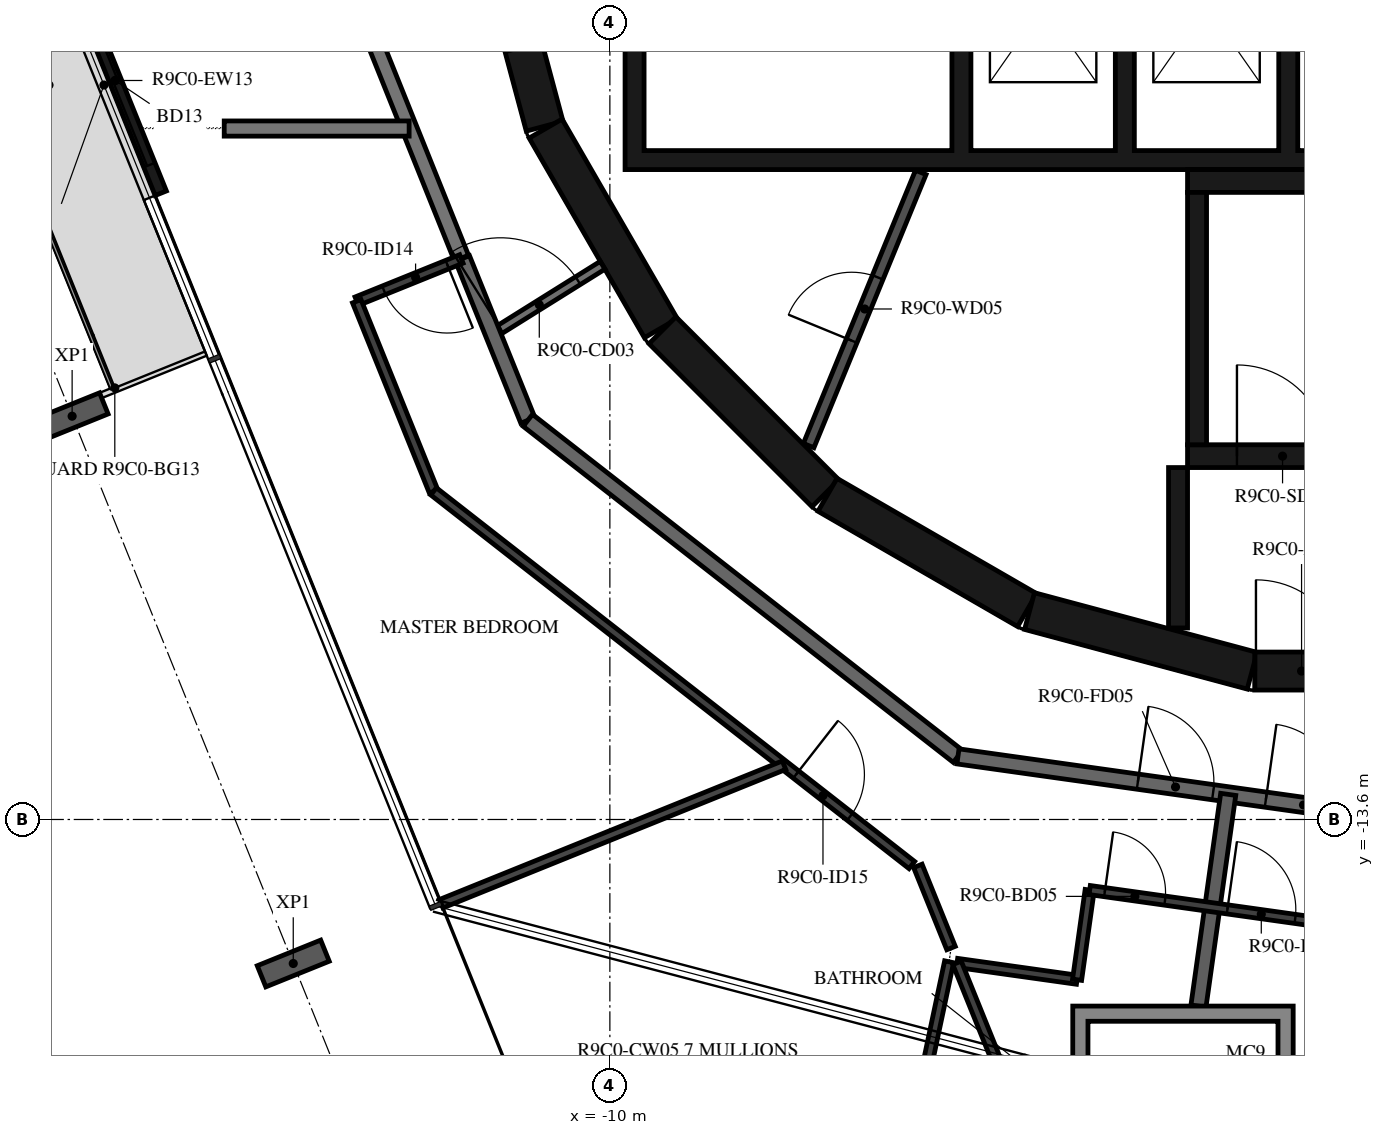
"""IFC4 building model, lengths in metres.
Left out: names, types, materials, properties, quantities, classifications, styles, units other than length and angle.
Written with IfcOpenShell. Run it as: python <this file> out.ifc"""

import sys

from ifc_helpers import new_model, si_unit, direction, frame, frame_2d, origin, origin_2d, place, context, subcontext, project, spatial, polyline, rectangle, i_section, outline, extrude, element, fill, save


model = new_model("IFC4")
c1 = context("Model", 3, precision=1e-05, world=origin(), true_north=direction((0.0, 1.0)))
c2 = subcontext(c1, "Body", "Model", "MODEL_VIEW")
j1 = project(units=[si_unit("LENGTHUNIT", "METRE"), si_unit("PLANEANGLEUNIT", "RADIAN")], contexts=[c1])
p1 = place(None, origin())
s1 = spatial("IfcSite", under=j1, at=p1, CompositionType="ELEMENT")
p2 = place(p1, origin())
s2 = spatial("IfcBuilding", under=s1, at=p2, CompositionType="ELEMENT")
p3 = place(p2, frame((0.0, 0.0, 354.0)))
s3 = spatial("IfcBuildingStorey", under=s2, at=p3, CompositionType="ELEMENT", Elevation=354.0)
for number, where, z_axis, x_axis in (
    (1, (-17.075, -8.294, -0.38), (0.0, 0.0, 1.0), (-0.375, 0.927, 0.0)),
    (2, (-14.166, -15.495, -0.38), (0.0, 0.0, 1.0), (-0.375, 0.927, 0.0)),
):
    element("IfcColumn", number, at=place(p3, frame(where, z_axis=z_axis, x_axis=x_axis)), inside=s3, PredefinedType="COLUMN", context=c2, shape_type="SweptSolid", body=[
        extrude(i_section(OverallWidth=0.3, OverallDepth=0.9, WebThickness=0.019, FlangeThickness=0.035, FilletRadius=0.03, at=origin_2d()), origin(), (0.0, 0.0, 1.0), 3.5),
    ])
p4 = place(p3, frame((-17.107, -2.394, 0.0), z_axis=(0.0, 0.0, 1.0), x_axis=(0.374598019739, -0.927187318511, 0.0)))
e3 = element("IfcWall", 3, at=p4, inside=s3, PredefinedType="STANDARD", context=c2, shape_type="SweptSolid", body=[
    extrude(rectangle(XDim=3.2, YDim=0.16, at=frame_2d((1.6, 0.0))), origin(), (0.0, 0.0, 1.0), 3.12),
])
p5 = place(p4, frame((0.4, 0.0, 0.0)))
e4 = element("IfcOpeningElement", 4, at=p5, cuts=e3, PredefinedType="OPENING", context=c2, shape_type="SweptSolid", body=[
    extrude(rectangle(XDim=2.4, YDim=2.4, at=frame_2d((1.2, 1.2))), frame((0.0, 0.09, 0.0), z_axis=(0.0, -1.0, 0.0), x_axis=(1.0, 0.0, 0.0)), (0.0, 0.0, 1.0), 0.18),
])
p6 = place(p3, frame((-11.643, -1.55, 0.0), z_axis=(0.0, 0.0, 1.0), x_axis=(0.258734743916, -0.965948410781, 0.0)))
e5 = element("IfcWall", 5, at=p6, inside=s3, PredefinedType="SHEAR", context=c2, shape_type="SweptSolid", body=[
    extrude(rectangle(XDim=3.033, YDim=0.5, at=frame_2d((1.516, 0.0))), origin(), (0.0, 0.0, 1.0), 3.12),
])
p7 = place(p6, frame((1.066, 0.0, 0.0)))
e6 = element("IfcOpeningElement", 6, at=p7, cuts=e5, PredefinedType="OPENING", context=c2, shape_type="SweptSolid", body=[
    extrude(rectangle(XDim=0.9, YDim=2.1, at=frame_2d((0.45, 1.05))), frame((0.0, 0.26, 0.0), z_axis=(0.0, -1.0, 0.0), x_axis=(1.0, 0.0, 0.0)), (0.0, 0.0, 1.0), 0.52),
])
p8 = place(p3, frame((-10.845, -4.51, 0.0), z_axis=(0.0, 0.0, 1.0), x_axis=(0.500087131594, -0.865975092491, 0.0)))
e7 = element("IfcWall", 7, at=p8, inside=s3, PredefinedType="SHEAR", context=c2, shape_type="SweptSolid", body=[
    extrude(rectangle(XDim=3.033, YDim=0.5, at=frame_2d((1.516, 0.0))), origin(), (0.0, 0.0, 1.0), 3.12),
])
p9 = place(p3, frame((-9.308, -7.164, 0.0), z_axis=(0.0, 0.0, 1.0), x_axis=(0.707106781187, -0.707106781187, 0.0)))
e8 = element("IfcWall", 8, at=p9, inside=s3, PredefinedType="SHEAR", context=c2, shape_type="SweptSolid", body=[
    extrude(rectangle(XDim=3.032, YDim=0.5, at=frame_2d((1.516, 0.0))), origin(), (0.0, 0.0, 1.0), 3.12),
])
for number, where, z_axis, x_axis in (
    (9, (-7.137, -9.329, 0.0), (0.0, 0.0, 1.0), (0.866, -0.5, 0.0)),
    (10, (-4.479, -10.858, 0.0), (0.0, 0.0, 1.0), (0.966, -0.259, 0.0)),
):
    element("IfcWall", number, at=place(p3, frame(where, z_axis=z_axis, x_axis=x_axis)), inside=s3, PredefinedType="SHEAR", context=c2, shape_type="SweptSolid", body=[
        extrude(rectangle(XDim=3.033, YDim=0.5, at=frame_2d((1.516, 0.0))), origin(), (0.0, 0.0, 1.0), 3.12),
    ])
p10 = place(p3, frame((-1.516, -11.647, 0.0), z_axis=(0.0, 0.0, 1.0), x_axis=(1.0, 0.0, 0.0)))
e11 = element("IfcWall", 11, at=p10, inside=s3, PredefinedType="SHEAR", context=c2, shape_type="SweptSolid", body=[
    extrude(rectangle(XDim=3.033, YDim=0.5, at=frame_2d((1.516, 0.0))), origin(), (0.0, 0.0, 1.0), 3.12),
])
p11 = place(p10, frame((0.016, 0.0, 0.0)))
e12 = element("IfcOpeningElement", 12, at=p11, cuts=e11, PredefinedType="OPENING", context=c2, shape_type="SweptSolid", body=[
    extrude(rectangle(XDim=1.2, YDim=2.1, at=frame_2d((0.6, 1.05))), frame((0.0, 0.26, 0.0), z_axis=(0.0, -1.0, 0.0), x_axis=(1.0, 0.0, 0.0)), (0.0, 0.0, 1.0), 0.52),
])
p12 = place(p3, frame((-2.275, -8.67, 0.0), z_axis=(0.0, 0.0, 1.0), x_axis=(0.0, 1.0, 0.0)))
e13 = element("IfcWall", 13, at=p12, inside=s3, PredefinedType="SHEAR", context=c2, shape_type="SweptSolid", body=[
    extrude(rectangle(XDim=3.32, YDim=0.25, at=frame_2d((1.66, 0.0))), origin(), (0.0, 0.0, 1.0), 3.12),
])
p13 = place(p3, frame((-2.4, -5.2, 0.0), z_axis=(0.0, 0.0, 1.0), x_axis=(1.0, 0.0, 0.0)))
e14 = element("IfcWall", 14, at=p13, inside=s3, PredefinedType="SHEAR", context=c2, shape_type="SweptSolid", body=[
    extrude(rectangle(XDim=7.05, YDim=0.3, at=frame_2d((3.525, 0.0))), origin(), (0.0, 0.0, 1.0), 3.12),
])
p14 = place(p3, frame((-2.4, -8.82, 0.0), z_axis=(0.0, 0.0, 1.0), x_axis=(1.0, 0.0, 0.0)))
e15 = element("IfcWall", 15, at=p14, inside=s3, PredefinedType="SHEAR", context=c2, shape_type="SweptSolid", body=[
    extrude(rectangle(XDim=2.5, YDim=0.3, at=frame_2d((1.25, 0.0))), origin(), (0.0, 0.0, 1.0), 3.12),
])
p15 = place(p14, frame((0.65, 0.0, 0.0)))
e16 = element("IfcOpeningElement", 16, at=p15, cuts=e15, PredefinedType="OPENING", context=c2, shape_type="SweptSolid", body=[
    extrude(rectangle(XDim=1.2, YDim=2.1, at=frame_2d((0.6, 1.05))), frame((0.0, 0.16, 0.0), z_axis=(0.0, -1.0, 0.0), x_axis=(1.0, 0.0, 0.0)), (0.0, 0.0, 1.0), 0.32),
])
p16 = place(p3, frame((-2.525, -8.97, 0.0), z_axis=(0.0, 0.0, 1.0), x_axis=(0.0, -1.0, 0.0)))
e17 = element("IfcWall", 17, at=p16, inside=s3, PredefinedType="SHEAR", context=c2, shape_type="SweptSolid", body=[
    extrude(rectangle(XDim=2.11, YDim=0.25, at=frame_2d((1.055, 0.0))), origin(), (0.0, 0.0, 1.0), 3.12),
])
p17 = place(p3, origin())
e18 = element("IfcWall", 18, at=p17, inside=s3, PredefinedType="SHEAR", context=c2, shape_type="SweptSolid", body=[
    extrude(outline(polyline([(9.8, -5.05), (9.8, -4.8), (9.8, -1.9), (9.55, -1.9), (9.55, -4.8), (7.65, -4.8), (7.65, -1.9), (7.4, -1.9), (7.4, -4.8), (5.5, -4.8), (5.5, -1.9), (5.25, -1.9), (5.25, -4.8), (3.35, -4.8), (3.35, -1.9), (3.1, -1.9), (3.1, -4.8), (1.2, -4.8), (1.2, -1.9), (0.95, -1.9), (0.95, -4.8), (-0.95, -4.8), (-0.95, -1.9), (-1.2, -1.9), (-1.2, -4.8), (-3.1, -4.8), (-3.1, -1.9), (-3.35, -1.9), (-3.35, -4.8), (-5.25, -4.8), (-5.25, -1.9), (-5.5, -1.9), (-5.5, -4.8), (-9.55, -4.8), (-9.55, -1.9), (-9.8, -1.9), (-9.8, -4.8), (-9.8, -5.05), (9.8, -5.05)])), origin(), (0.0, 0.0, 1.0), 3.12),
])
p18 = place(p3, frame((-7.385, -8.681, 0.0), z_axis=(0.0, 0.0, 1.0), x_axis=(0.379804590409, 0.925066739811, 0.0)))
e19 = element("IfcWall", 19, at=p18, inside=s3, PredefinedType="PARTITIONING", context=c2, shape_type="SweptSolid", body=[
    extrude(rectangle(XDim=3.885, YDim=0.15, at=frame_2d((1.942, 0.0))), origin(), (0.0, 0.0, 1.0), 3.12),
])
p19 = place(p18, frame((1.493, 0.0, 0.0)))
e20 = element("IfcOpeningElement", 20, at=p19, cuts=e19, PredefinedType="OPENING", context=c2, shape_type="SweptSolid", body=[
    extrude(rectangle(XDim=0.9, YDim=2.1, at=frame_2d((0.45, 1.05))), frame((0.0, 0.085, 0.0), z_axis=(0.0, -1.0, 0.0), x_axis=(1.0, 0.0, 0.0)), (0.0, 0.0, 1.0), 0.17),
])
p20 = place(p3, frame((-11.539, -7.21, 0.0), z_axis=(0.0, 0.0, 1.0), x_axis=(0.848103039868, 0.529831325769, 0.0)))
e21 = element("IfcWall", 21, at=p20, inside=s3, PredefinedType="PARTITIONING", context=c2, shape_type="SweptSolid", body=[
    extrude(rectangle(XDim=1.702, YDim=0.12, at=frame_2d((0.851, 0.0))), origin(), (0.0, 0.0, 1.0), 3.12),
])
p21 = place(p20, frame((0.12, 0.0, 0.0)))
e22 = element("IfcOpeningElement", 22, at=p21, cuts=e21, PredefinedType="OPENING", context=c2, shape_type="SweptSolid", body=[
    extrude(rectangle(XDim=1.2, YDim=2.1, at=frame_2d((0.6, 1.05))), frame((0.0, 0.07, 0.0), z_axis=(0.0, -1.0, 0.0), x_axis=(1.0, 0.0, 0.0)), (0.0, 0.0, 1.0), 0.14),
])
p22 = place(p3, frame((-13.769, -1.691, 0.0), z_axis=(0.0, 0.0, 1.0), x_axis=(0.372720094028, -0.927943819155, 0.0)))
e23 = element("IfcWall", 23, at=p22, inside=s3, PredefinedType="STANDARD", context=c2, shape_type="SweptSolid", body=[
    extrude(rectangle(XDim=4.875, YDim=0.2, at=frame_2d((2.438, 0.0))), origin(), (0.0, 0.0, 1.0), 3.12),
])
p23 = place(p3, frame((-11.939, -6.22, 0.0), z_axis=(0.0, 0.0, 1.0), x_axis=(0.374651128394, -0.927165860024, 0.0)))
e24 = element("IfcWall", 24, at=p23, inside=s3, PredefinedType="STANDARD", context=c2, shape_type="SweptSolid", body=[
    extrude(rectangle(XDim=2.296, YDim=0.2, at=frame_2d((1.148, 0.0))), origin(), (0.0, 0.0, 1.0), 3.12),
])
p24 = place(p3, frame((-11.079, -8.349, 0.0), z_axis=(0.0, 0.0, 1.0), x_axis=(0.78800478687, -0.615669112324, 0.0)))
e25 = element("IfcWall", 25, at=p24, inside=s3, PredefinedType="STANDARD", context=c2, shape_type="SweptSolid", body=[
    extrude(rectangle(XDim=7.181, YDim=0.2, at=frame_2d((3.591, 0.0))), origin(), (0.0, 0.0, 1.0), 3.12),
])
p25 = place(p3, frame((-5.42, -12.77, 0.0), z_axis=(0.0, 0.0, 1.0), x_axis=(0.990270565508, -0.139155334385, 0.0)))
e26 = element("IfcWall", 26, at=p25, inside=s3, PredefinedType="STANDARD", context=c2, shape_type="SweptSolid", body=[
    extrude(rectangle(XDim=7.181, YDim=0.2, at=frame_2d((3.59, 0.0))), origin(), (0.0, 0.0, 1.0), 3.12),
])
p26 = place(p25, frame((2.39, 0.0, 0.0)))
e27 = element("IfcOpeningElement", 27, at=p26, cuts=e26, PredefinedType="OPENING", context=c2, shape_type="SweptSolid", body=[
    extrude(rectangle(XDim=1.0, YDim=2.1, at=frame_2d((0.5, 1.05))), frame((0.0, 0.11, 0.0), z_axis=(0.0, -1.0, 0.0), x_axis=(1.0, 0.0, 0.0)), (0.0, 0.0, 1.0), 0.22),
])
p27 = place(p25, frame((4.091, 0.0, 0.0)))
e28 = element("IfcOpeningElement", 28, at=p27, cuts=e26, PredefinedType="OPENING", context=c2, shape_type="SweptSolid", body=[
    extrude(rectangle(XDim=1.0, YDim=2.1, at=frame_2d((0.5, 1.05))), frame((0.0, 0.11, 0.0), z_axis=(0.0, -1.0, 0.0), x_axis=(1.0, 0.0, 0.0)), (0.0, 0.0, 1.0), 0.22),
])
p28 = place(p3, frame((-15.074, -4.51, 0.0), z_axis=(0.0, 0.0, 1.0), x_axis=(1.0, 0.0, 0.0)))
e29 = element("IfcWall", 29, at=p28, inside=s3, PredefinedType="STANDARD", context=c2, shape_type="SweptSolid", body=[
    extrude(rectangle(XDim=2.433, YDim=0.2, at=frame_2d((1.216, 0.0))), origin(), (0.0, 0.0, 1.0), 3.12),
])
p29 = place(p3, frame((-2.256, -16.055, 0.0), z_axis=(0.0, 0.0, 1.0), x_axis=(0.139148428478, 0.990271535919, 0.0)))
e30 = element("IfcWall", 30, at=p29, inside=s3, PredefinedType="STANDARD", context=c2, shape_type="SweptSolid", body=[
    extrude(rectangle(XDim=2.812, YDim=0.2, at=frame_2d((1.406, 0.0))), origin(), (0.0, 0.0, 1.0), 3.12),
])
p30 = place(p3, frame((-11.953, -6.225, 0.0), z_axis=(0.0, 0.0, 1.0), x_axis=(-0.927144096717, -0.374704982518, 0.0)))
e31 = element("IfcWall", 31, at=p30, inside=s3, PredefinedType="PARTITIONING", context=c2, shape_type="SweptSolid", body=[
    extrude(rectangle(XDim=1.485, YDim=0.12, at=frame_2d((0.742, 0.0))), origin(), (0.0, 0.0, 1.0), 3.12),
])
p31 = place(p30, frame((0.2, 0.0, 0.0)))
e32 = element("IfcOpeningElement", 32, at=p31, cuts=e31, PredefinedType="OPENING", context=c2, shape_type="SweptSolid", body=[
    extrude(rectangle(XDim=0.9, YDim=2.1, at=frame_2d((0.45, 1.05))), frame((0.0, 0.07, 0.0), z_axis=(0.0, -1.0, 0.0), x_axis=(1.0, 0.0, 0.0)), (0.0, 0.0, 1.0), 0.14),
])
p32 = place(p3, frame((-13.33, -6.782, 0.0), z_axis=(0.0, 0.0, 1.0), x_axis=(0.374602180132, -0.927185637637, 0.0)))
e33 = element("IfcWall", 33, at=p32, inside=s3, PredefinedType="PARTITIONING", context=c2, shape_type="SweptSolid", body=[
    extrude(rectangle(XDim=2.698, YDim=0.12, at=frame_2d((1.349, 0.0))), origin(), (0.0, 0.0, 1.0), 3.12),
])
p33 = place(p3, frame((-12.319, -9.283, 0.0), z_axis=(0.0, 0.0, 1.0), x_axis=(0.788000268464, -0.61567489546, 0.0)))
e34 = element("IfcWall", 34, at=p33, inside=s3, PredefinedType="PARTITIONING", context=c2, shape_type="SweptSolid", body=[
    extrude(rectangle(XDim=7.985, YDim=0.12, at=frame_2d((3.992, 0.0))), origin(), (0.0, 0.0, 1.0), 3.12),
])
p34 = place(p33, frame((6.051, 0.0, 0.0)))
e35 = element("IfcOpeningElement", 35, at=p34, cuts=e34, PredefinedType="OPENING", context=c2, shape_type="SweptSolid", body=[
    extrude(rectangle(XDim=0.9, YDim=2.1, at=frame_2d((0.45, 1.05))), frame((0.0, 0.07, 0.0), z_axis=(0.0, -1.0, 0.0), x_axis=(1.0, 0.0, 0.0)), (0.0, 0.0, 1.0), 0.14),
])
p35 = place(p3, frame((-5.948, -14.21, 0.0), z_axis=(0.0, 0.0, 1.0), x_axis=(0.374601530156, -0.927185900241, 0.0)))
e36 = element("IfcWall", 36, at=p35, inside=s3, PredefinedType="PARTITIONING", context=c2, shape_type="SweptSolid", body=[
    extrude(rectangle(XDim=1.166, YDim=0.12, at=frame_2d((0.583, 0.0))), origin(), (0.0, 0.0, 1.0), 3.12),
])
p36 = place(p3, frame((-5.433, -15.487, 0.0), z_axis=(0.0, 0.0, 1.0), x_axis=(0.990268451053, -0.139170380644, 0.0)))
e37 = element("IfcWall", 37, at=p36, inside=s3, PredefinedType="PARTITIONING", context=c2, shape_type="SweptSolid", body=[
    extrude(rectangle(XDim=1.595, YDim=0.12, at=frame_2d((0.797, 0.0))), origin(), (0.0, 0.0, 1.0), 3.12),
])
p37 = place(p3, frame((-3.854, -15.708, 0.0), z_axis=(0.0, 0.0, 1.0), x_axis=(0.139298773474, 0.99025039849, 0.0)))
e38 = element("IfcWall", 38, at=p37, inside=s3, PredefinedType="PARTITIONING", context=c2, shape_type="SweptSolid", body=[
    extrude(rectangle(XDim=1.192, YDim=0.12, at=frame_2d((0.596, 0.0))), origin(), (0.0, 0.0, 1.0), 3.12),
])
p38 = place(p3, frame((-3.688, -14.528, 0.0), z_axis=(0.0, 0.0, 1.0), x_axis=(0.990273413633, -0.139135064782, 0.0)))
e39 = element("IfcWall", 39, at=p38, inside=s3, PredefinedType="PARTITIONING", context=c2, shape_type="SweptSolid", body=[
    extrude(rectangle(XDim=5.622, YDim=0.12, at=frame_2d((2.811, 0.0))), origin(), (0.0, 0.0, 1.0), 3.12),
])
p39 = place(p38, frame((0.2, 0.0, 0.0)))
e40 = element("IfcOpeningElement", 40, at=p39, cuts=e39, PredefinedType="OPENING", context=c2, shape_type="SweptSolid", body=[
    extrude(rectangle(XDim=0.8, YDim=2.1, at=frame_2d((0.4, 1.05))), frame((0.0, 0.07, 0.0), z_axis=(0.0, -1.0, 0.0), x_axis=(1.0, 0.0, 0.0)), (0.0, 0.0, 1.0), 0.14),
])
p40 = place(p38, frame((1.83, 0.0, 0.0)))
e41 = element("IfcOpeningElement", 41, at=p40, cuts=e39, PredefinedType="OPENING", context=c2, shape_type="SweptSolid", body=[
    extrude(rectangle(XDim=0.9, YDim=2.1, at=frame_2d((0.45, 1.05))), frame((0.0, 0.07, 0.0), z_axis=(0.0, -1.0, 0.0), x_axis=(1.0, 0.0, 0.0)), (0.0, 0.0, 1.0), 0.14),
])
p41 = place(p3, frame((-12.219, -14.708, 0.0), z_axis=(0.0, 0.0, 1.0), x_axis=(0.927176471086, 0.374624867655, 0.0)))
e42 = element("IfcWall", 42, at=p41, inside=s3, PredefinedType="PARTITIONING", context=c2, shape_type="SweptSolid", body=[
    extrude(rectangle(XDim=4.864, YDim=0.12, at=frame_2d((2.432, 0.0))), origin(), (0.0, 0.0, 1.0), 2.73),
])
p42 = place(p3, frame((-7.305, -23.815, 0.0), z_axis=(0.0, 0.0, 1.0), x_axis=(0.207366409306, 0.978263345062, 0.0)))
e43 = element("IfcWall", 43, at=p42, inside=s3, PredefinedType="PARTITIONING", context=c2, shape_type="SweptSolid", body=[
    extrude(rectangle(XDim=8.529, YDim=0.12, at=frame_2d((4.264, 0.0))), origin(), (0.0, 0.0, 1.0), 3.12),
])
p43 = place(p42, frame((0.4, 0.0, 0.0)))
e44 = element("IfcOpeningElement", 44, at=p43, cuts=e43, PredefinedType="OPENING", context=c2, shape_type="SweptSolid", body=[
    extrude(rectangle(XDim=0.9, YDim=2.1, at=frame_2d((0.45, 1.05))), frame((0.0, 0.07, 0.0), z_axis=(0.0, -1.0, 0.0), x_axis=(1.0, 0.0, 0.0)), (0.0, 0.0, 1.0), 0.14),
])
p44 = place(p3, frame((-4.445, -17.93, 0.0), z_axis=(0.0, 0.0, 1.0), x_axis=(-0.374614676827, 0.927180588616, 0.0)))
e45 = element("IfcWall", 45, at=p44, inside=s3, PredefinedType="PARTITIONING", context=c2, shape_type="SweptSolid", body=[
    extrude(rectangle(XDim=2.635, YDim=0.12, at=frame_2d((1.318, 0.0))), origin(), (0.0, 0.0, 1.0), 3.12),
])
p45 = place(p3, origin())
e46 = element("IfcWall", 46, at=p45, inside=s3, PredefinedType="STANDARD", context=c2, shape_type="SweptSolid", body=[
    extrude(outline(polyline([(-1.01, -16.055), (-1.01, -18.955), (-3.91, -18.955), (-3.91, -16.055), (-1.01, -16.055)]), holes=[polyline([(-3.71, -18.755), (-1.21, -18.755), (-1.21, -16.255), (-3.71, -16.255), (-3.71, -18.755)])]), origin(), (0.0, 0.0, 1.0), 3.12),
])
p46 = place(p5, origin())
e47 = element("IfcDoor", 47, at=p46, inside=s3, OperationType="DOUBLE_DOOR_SLIDING", PredefinedType="DOOR", context=c2, shape_type="SweptSolid", body=[
    extrude(rectangle(XDim=2.4, YDim=2.4, at=frame_2d((1.2, 1.2))), frame((0.0, 0.025, 0.0), z_axis=(0.0, -1.0, 0.0), x_axis=(1.0, 0.0, 0.0)), (0.0, 0.0, 1.0), 0.05),
])
fill(e4, e47)
p47 = place(p15, origin())
e48 = element("IfcDoor", 48, at=p47, inside=s3, OperationType="SINGLE_SWING_LEFT", PredefinedType="DOOR", context=c2, shape_type="SweptSolid", body=[
    extrude(rectangle(XDim=1.2, YDim=2.1, at=frame_2d((0.6, 1.05))), frame((0.0, 0.025, 0.0), z_axis=(0.0, -1.0, 0.0), x_axis=(1.0, 0.0, 0.0)), (0.0, 0.0, 1.0), 0.05),
])
fill(e16, e48)
p48 = place(p11, origin())
e49 = element("IfcDoor", 49, at=p48, inside=s3, OperationType="SINGLE_SWING_RIGHT", PredefinedType="DOOR", context=c2, shape_type="SweptSolid", body=[
    extrude(rectangle(XDim=1.2, YDim=2.1, at=frame_2d((0.6, 1.05))), frame((0.0, 0.025, 0.0), z_axis=(0.0, -1.0, 0.0), x_axis=(1.0, 0.0, 0.0)), (0.0, 0.0, 1.0), 0.05),
])
fill(e12, e49)
p49 = place(p19, origin())
e50 = element("IfcDoor", 50, at=p49, inside=s3, OperationType="SINGLE_SWING_LEFT", PredefinedType="DOOR", context=c2, shape_type="SweptSolid", body=[
    extrude(rectangle(XDim=0.9, YDim=2.1, at=frame_2d((0.45, 1.05))), frame((0.0, 0.025, 0.0), z_axis=(0.0, -1.0, 0.0), x_axis=(1.0, 0.0, 0.0)), (0.0, 0.0, 1.0), 0.05),
])
fill(e20, e50)
p50 = place(p26, origin())
e51 = element("IfcDoor", 51, at=p50, inside=s3, OperationType="SINGLE_SWING_RIGHT", PredefinedType="DOOR", context=c2, shape_type="SweptSolid", body=[
    extrude(rectangle(XDim=1.0, YDim=2.1, at=frame_2d((0.5, 1.05))), frame((0.0, 0.025, 0.0), z_axis=(0.0, -1.0, 0.0), x_axis=(1.0, 0.0, 0.0)), (0.0, 0.0, 1.0), 0.05),
])
fill(e27, e51)
p51 = place(p31, origin())
e52 = element("IfcDoor", 52, at=p51, inside=s3, OperationType="SINGLE_SWING_LEFT", PredefinedType="DOOR", context=c2, shape_type="SweptSolid", body=[
    extrude(rectangle(XDim=0.9, YDim=2.1, at=frame_2d((0.45, 1.05))), frame((0.0, 0.025, 0.0), z_axis=(0.0, -1.0, 0.0), x_axis=(1.0, 0.0, 0.0)), (0.0, 0.0, 1.0), 0.05),
])
fill(e32, e52)
p52 = place(p34, origin())
e53 = element("IfcDoor", 53, at=p52, inside=s3, OperationType="SINGLE_SWING_RIGHT", PredefinedType="DOOR", context=c2, shape_type="SweptSolid", body=[
    extrude(rectangle(XDim=0.9, YDim=2.1, at=frame_2d((0.45, 1.05))), frame((0.0, 0.025, 0.0), z_axis=(0.0, -1.0, 0.0), x_axis=(1.0, 0.0, 0.0)), (0.0, 0.0, 1.0), 0.05),
])
fill(e35, e53)
p53 = place(p39, origin())
e54 = element("IfcDoor", 54, at=p53, inside=s3, OperationType="SINGLE_SWING_RIGHT", PredefinedType="DOOR", context=c2, shape_type="SweptSolid", body=[
    extrude(rectangle(XDim=0.8, YDim=2.1, at=frame_2d((0.4, 1.05))), frame((0.0, 0.025, 0.0), z_axis=(0.0, -1.0, 0.0), x_axis=(1.0, 0.0, 0.0)), (0.0, 0.0, 1.0), 0.05),
])
fill(e40, e54)
p54 = place(p27, origin())
e55 = element("IfcDoor", 55, at=p54, inside=s3, OperationType="SINGLE_SWING_RIGHT", PredefinedType="DOOR", context=c2, shape_type="SweptSolid", body=[
    extrude(rectangle(XDim=1.0, YDim=2.1, at=frame_2d((0.5, 1.05))), frame((0.0, 0.025, 0.0), z_axis=(0.0, -1.0, 0.0), x_axis=(1.0, 0.0, 0.0)), (0.0, 0.0, 1.0), 0.05),
])
fill(e28, e55)
p55 = place(p40, origin())
e56 = element("IfcDoor", 56, at=p55, inside=s3, OperationType="SINGLE_SWING_RIGHT", PredefinedType="DOOR", context=c2, shape_type="SweptSolid", body=[
    extrude(rectangle(XDim=0.9, YDim=2.1, at=frame_2d((0.45, 1.05))), frame((0.0, 0.025, 0.0), z_axis=(0.0, -1.0, 0.0), x_axis=(1.0, 0.0, 0.0)), (0.0, 0.0, 1.0), 0.05),
])
fill(e41, e56)
p56 = place(p21, origin())
e57 = element("IfcDoor", 57, at=p56, inside=s3, OperationType="DOUBLE_DOOR_SINGLE_SWING", PredefinedType="DOOR", context=c2, shape_type="SweptSolid", body=[
    extrude(rectangle(XDim=1.2, YDim=2.1, at=frame_2d((0.6, 1.05))), frame((0.0, 0.025, 0.0), z_axis=(0.0, -1.0, 0.0), x_axis=(1.0, 0.0, 0.0)), (0.0, 0.0, 1.0), 0.05),
])
fill(e22, e57)
save(model, sys.argv[1])
